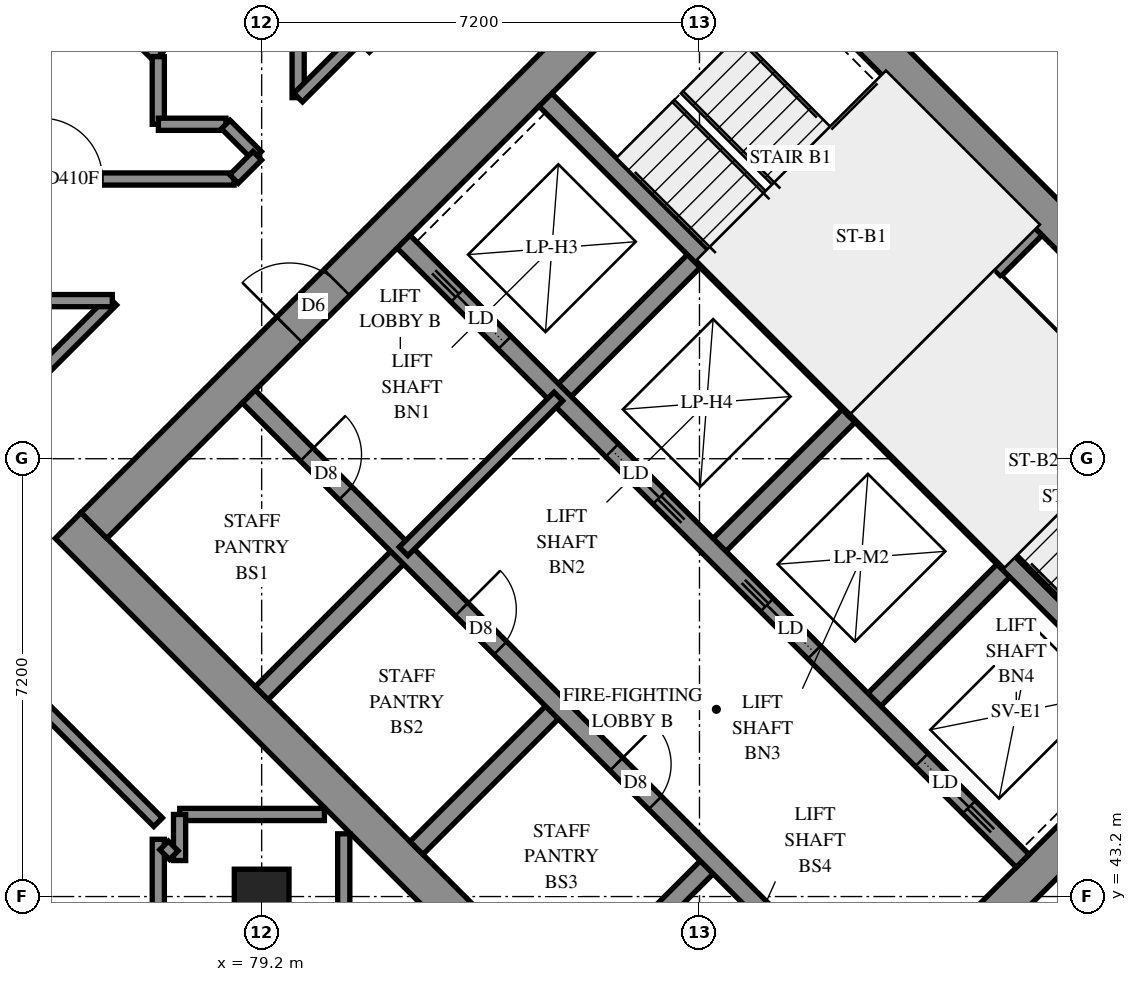
"""IFC4 building model, lengths in metres.
Left out: names, types, materials, properties, quantities, classifications, styles, units other than length and angle.
Written with IfcOpenShell. Run it as: python <this file> out.ifc"""

import sys

from ifc_helpers import new_model, si_unit, direction, frame, frame_2d, origin, origin_2d, place, context, subcontext, project, spatial, rectangle, extrude, element, fill, save


model = new_model("IFC4")
c1 = context("Model", 3, precision=1e-05, world=origin(), true_north=direction((0.0, 1.0)))
c2 = subcontext(c1, "Body", "Model", "MODEL_VIEW")
j1 = project(units=[si_unit("LENGTHUNIT", "METRE"), si_unit("PLANEANGLEUNIT", "RADIAN")], contexts=[c1])
p1 = place(None, origin())
s1 = spatial("IfcSite", under=j1, at=p1, CompositionType="ELEMENT")
p2 = place(p1, origin())
s2 = spatial("IfcBuilding", under=s1, at=p2, CompositionType="ELEMENT")
p3 = place(p2, frame((0.0, 0.0, 142.2)))
s3 = spatial("IfcBuildingStorey", under=s2, at=p3, CompositionType="ELEMENT", Elevation=142.2)
p4 = place(p3, frame((79.2, 43.2, 0.0), z_axis=(0.0, 0.0, 1.0), x_axis=(1.0, 0.0, 0.0)))
e1 = element("IfcColumn", 1, at=p4, inside=s3, PredefinedType="COLUMN", context=c2, shape_type="SweptSolid", body=[
    extrude(rectangle(XDim=0.9, YDim=0.9, at=origin_2d()), origin(), (0.0, 0.0, 1.0), 3.1),
])
p5 = place(p3, frame((76.018, 49.302, -0.3), z_axis=(0.0, 0.0, 1.0), x_axis=(0.7071067812, -0.7071067812, 0.0)))
e2 = element("IfcWall", 2, at=p5, inside=s3, PredefinedType="SHEAR", context=c2, shape_type="SweptSolid", body=[
    extrude(rectangle(XDim=15.6, YDim=0.6, at=frame_2d((7.8, 0.0))), origin(), (0.0, 0.0, 1.0), 2.7),
])
p6 = place(p3, frame((86.625, 59.908, -0.3), z_axis=(0.0, 0.0, 1.0), x_axis=(0.7071067812, -0.7071067812, 0.0)))
e3 = element("IfcWall", 3, at=p6, inside=s3, PredefinedType="SHEAR", context=c2, shape_type="SweptSolid", body=[
    extrude(rectangle(XDim=15.6, YDim=0.6, at=frame_2d((7.8, 0.0))), origin(), (0.0, 0.0, 1.0), 2.7),
])
p7 = place(p6, frame((10.6, 0.0, 0.3)))
e4 = element("IfcOpeningElement", 4, at=p7, cuts=e3, PredefinedType="OPENING", context=c2, shape_type="SweptSolid", body=[
    extrude(rectangle(XDim=0.8, YDim=2.1, at=frame_2d((0.4, 1.05))), frame((0.0, 0.31, 0.0), z_axis=(0.0, -1.0, 0.0), x_axis=(1.0, 0.0, 0.0)), (0.0, 0.0, 1.0), 0.62),
])
p8 = place(p3, frame((76.442, 49.302, -0.3), z_axis=(0.0, 0.0, 1.0), x_axis=(0.7071067812, 0.7071067812, 0.0)))
e5 = element("IfcWall", 5, at=p8, inside=s3, PredefinedType="SHEAR", context=c2, shape_type="SweptSolid", body=[
    extrude(rectangle(XDim=14.4, YDim=0.6, at=frame_2d((7.2, 0.0))), origin(), (0.0, 0.0, 1.0), 2.7),
])
p9 = place(p8, frame((4.55, 0.0, 0.3)))
e6 = element("IfcOpeningElement", 6, at=p9, cuts=e5, PredefinedType="OPENING", context=c2, shape_type="SweptSolid", body=[
    extrude(rectangle(XDim=1.1, YDim=2.1, at=frame_2d((0.55, 1.05))), frame((0.0, 0.31, 0.0), z_axis=(0.0, -1.0, 0.0), x_axis=(1.0, 0.0, 0.0)), (0.0, 0.0, 1.0), 0.62),
])
p10 = place(p8, frame((11.35, 0.0, 0.3)))
e7 = element("IfcOpeningElement", 7, at=p10, cuts=e5, PredefinedType="OPENING", context=c2, shape_type="SweptSolid", body=[
    extrude(rectangle(XDim=1.1, YDim=2.1, at=frame_2d((0.55, 1.05))), frame((0.0, 0.31, 0.0), z_axis=(0.0, -1.0, 0.0), x_axis=(1.0, 0.0, 0.0)), (0.0, 0.0, 1.0), 0.62),
])
p11 = place(p3, frame((87.049, 38.695, -0.3), z_axis=(0.0, 0.0, 1.0), x_axis=(0.7071067812, 0.7071067812, 0.0)))
e8 = element("IfcWall", 8, at=p11, inside=s3, PredefinedType="SHEAR", context=c2, shape_type="SweptSolid", body=[
    extrude(rectangle(XDim=14.4, YDim=0.6, at=frame_2d((7.2, 0.0))), origin(), (0.0, 0.0, 1.0), 2.7),
])
p12 = place(p11, frame((4.55, 0.0, 0.3)))
e9 = element("IfcOpeningElement", 9, at=p12, cuts=e8, PredefinedType="OPENING", context=c2, shape_type="SweptSolid", body=[
    extrude(rectangle(XDim=1.1, YDim=2.1, at=frame_2d((0.55, 1.05))), frame((0.0, 0.31, 0.0), z_axis=(0.0, -1.0, 0.0), x_axis=(1.0, 0.0, 0.0)), (0.0, 0.0, 1.0), 0.62),
])
p13 = place(p11, frame((11.35, 0.0, 0.3)))
e10 = element("IfcOpeningElement", 10, at=p13, cuts=e8, PredefinedType="OPENING", context=c2, shape_type="SweptSolid", body=[
    extrude(rectangle(XDim=1.1, YDim=2.1, at=frame_2d((0.55, 1.05))), frame((0.0, 0.31, 0.0), z_axis=(0.0, -1.0, 0.0), x_axis=(1.0, 0.0, 0.0)), (0.0, 0.0, 1.0), 0.62),
])
for number, where, z_axis, x_axis in (
    (11, (79.2, 46.544, 0.0), (0.0, 0.0, 1.0), (0.707, 0.707, 0.0)),
    (12, (84.079, 51.423, 0.0), (0.0, 0.0, 1.0), (0.707, 0.707, 0.0)),
):
    element("IfcWall", number, at=place(p3, frame(where, z_axis=z_axis, x_axis=x_axis)), inside=s3, PredefinedType="SOLIDWALL", context=c2, shape_type="SweptSolid", body=[
        extrude(rectangle(XDim=3.3, YDim=0.3, at=frame_2d((1.65, 0.0))), origin(), (0.0, 0.0, 1.0), 3.1),
    ])
p14 = place(p3, frame((81.746, 43.999, 0.0), z_axis=(0.0, 0.0, 1.0), x_axis=(0.7071067812, 0.7071067812, 0.0)))
e13 = element("IfcWall", 13, at=p14, inside=s3, PredefinedType="SOLIDWALL", context=c2, shape_type="SweptSolid", body=[
    extrude(rectangle(XDim=3.3, YDim=0.3, at=frame_2d((1.65, 0.0))), origin(), (0.0, 0.0, 1.0), 3.1),
])
p15 = place(p3, frame((86.625, 48.878, 0.0), z_axis=(0.0, 0.0, 1.0), x_axis=(0.7071067812, 0.7071067812, 0.0)))
e14 = element("IfcWall", 14, at=p15, inside=s3, PredefinedType="SOLIDWALL", context=c2, shape_type="SweptSolid", body=[
    extrude(rectangle(XDim=3.3, YDim=0.3, at=frame_2d((1.65, 0.0))), origin(), (0.0, 0.0, 1.0), 3.1),
])
p16 = place(p3, frame((84.291, 41.453, 0.0), z_axis=(0.0, 0.0, 1.0), x_axis=(0.7071067812, 0.7071067812, 0.0)))
e15 = element("IfcWall", 15, at=p16, inside=s3, PredefinedType="SOLIDWALL", context=c2, shape_type="SweptSolid", body=[
    extrude(rectangle(XDim=3.3, YDim=0.3, at=frame_2d((1.65, 0.0))), origin(), (0.0, 0.0, 1.0), 3.1),
])
p17 = place(p3, frame((89.17, 46.332, 0.0), z_axis=(0.0, 0.0, 1.0), x_axis=(0.7071067812, 0.7071067812, 0.0)))
e16 = element("IfcWall", 16, at=p17, inside=s3, PredefinedType="SOLIDWALL", context=c2, shape_type="SweptSolid", body=[
    extrude(rectangle(XDim=3.3, YDim=0.3, at=frame_2d((1.65, 0.0))), origin(), (0.0, 0.0, 1.0), 3.1),
])
p18 = place(p3, frame((78.988, 51.423, 0.0), z_axis=(0.0, 0.0, 1.0), x_axis=(0.7071067812, -0.7071067812, 0.0)))
e17 = element("IfcWall", 17, at=p18, inside=s3, PredefinedType="SOLIDWALL", context=c2, shape_type="SweptSolid", body=[
    extrude(rectangle(XDim=14.4, YDim=0.3, at=frame_2d((7.2, 0.0))), origin(), (0.0, 0.0, 1.0), 3.1),
])
p19 = place(p18, frame((1.35, 0.0, 0.0)))
e18 = element("IfcOpeningElement", 18, at=p19, cuts=e17, PredefinedType="OPENING", context=c2, shape_type="SweptSolid", body=[
    extrude(rectangle(XDim=0.9, YDim=2.1, at=frame_2d((0.45, 1.05))), frame((0.0, 0.16, 0.0), z_axis=(0.0, -1.0, 0.0), x_axis=(1.0, 0.0, 0.0)), (0.0, 0.0, 1.0), 0.32),
])
p20 = place(p18, frame((4.95, 0.0, 0.0)))
e19 = element("IfcOpeningElement", 19, at=p20, cuts=e17, PredefinedType="OPENING", context=c2, shape_type="SweptSolid", body=[
    extrude(rectangle(XDim=0.9, YDim=2.1, at=frame_2d((0.45, 1.05))), frame((0.0, 0.16, 0.0), z_axis=(0.0, -1.0, 0.0), x_axis=(1.0, 0.0, 0.0)), (0.0, 0.0, 1.0), 0.32),
])
p21 = place(p18, frame((8.55, 0.0, 0.0)))
e20 = element("IfcOpeningElement", 20, at=p21, cuts=e17, PredefinedType="OPENING", context=c2, shape_type="SweptSolid", body=[
    extrude(rectangle(XDim=0.9, YDim=2.1, at=frame_2d((0.45, 1.05))), frame((0.0, 0.16, 0.0), z_axis=(0.0, -1.0, 0.0), x_axis=(1.0, 0.0, 0.0)), (0.0, 0.0, 1.0), 0.32),
])
p22 = place(p18, frame((12.05, 0.0, 0.0)))
e21 = element("IfcOpeningElement", 21, at=p22, cuts=e17, PredefinedType="OPENING", context=c2, shape_type="SweptSolid", body=[
    extrude(rectangle(XDim=1.1, YDim=2.1, at=frame_2d((0.55, 1.05))), frame((0.0, 0.16, 0.0), z_axis=(0.0, -1.0, 0.0), x_axis=(1.0, 0.0, 0.0)), (0.0, 0.0, 1.0), 0.32),
])
p23 = place(p3, frame((81.534, 53.969, 0.0), z_axis=(0.0, 0.0, 1.0), x_axis=(0.707103309, -0.7071102534, 0.0)))
e22 = element("IfcWall", 22, at=p23, inside=s3, PredefinedType="SOLIDWALL", context=c2, shape_type="SweptSolid", body=[
    extrude(rectangle(XDim=14.4, YDim=0.3, at=frame_2d((7.2, 0.0))), origin(), (0.0, 0.0, 1.0), 3.1),
])
p24 = place(p23, frame((1.25, 0.0, 0.0)))
e23 = element("IfcOpeningElement", 23, at=p24, cuts=e22, PredefinedType="OPENING", context=c2, shape_type="SweptSolid", body=[
    extrude(rectangle(XDim=1.1, YDim=2.1, at=frame_2d((0.55, 1.05))), frame((0.0, 0.16, 0.0), z_axis=(0.0, -1.0, 0.0), x_axis=(1.0, 0.0, 0.0)), (0.0, 0.0, 1.0), 0.32),
])
p25 = place(p23, frame((4.85, 0.0, 0.0)))
e24 = element("IfcOpeningElement", 24, at=p25, cuts=e22, PredefinedType="OPENING", context=c2, shape_type="SweptSolid", body=[
    extrude(rectangle(XDim=1.1, YDim=2.1, at=frame_2d((0.55, 1.05))), frame((0.0, 0.16, 0.0), z_axis=(0.0, -1.0, 0.0), x_axis=(1.0, 0.0, 0.0)), (0.0, 0.0, 1.0), 0.32),
])
p26 = place(p23, frame((8.45, 0.0, 0.0)))
e25 = element("IfcOpeningElement", 25, at=p26, cuts=e22, PredefinedType="OPENING", context=c2, shape_type="SweptSolid", body=[
    extrude(rectangle(XDim=1.1, YDim=2.1, at=frame_2d((0.55, 1.05))), frame((0.0, 0.16, 0.0), z_axis=(0.0, -1.0, 0.0), x_axis=(1.0, 0.0, 0.0)), (0.0, 0.0, 1.0), 0.32),
])
p27 = place(p23, frame((12.05, 0.0, 0.0)))
e26 = element("IfcOpeningElement", 26, at=p27, cuts=e22, PredefinedType="OPENING", context=c2, shape_type="SweptSolid", body=[
    extrude(rectangle(XDim=1.1, YDim=2.1, at=frame_2d((0.55, 1.05))), frame((0.0, 0.16, 0.0), z_axis=(0.0, -1.0, 0.0), x_axis=(1.0, 0.0, 0.0)), (0.0, 0.0, 1.0), 0.32),
])
for number, where, z_axis, x_axis in (
    (27, (83.867, 56.302, 0.0), (0.0, 0.0, 1.0), (0.707, -0.707, 0.0)),
    (28, (88.958, 51.211, 0.0), (0.0, 0.0, 1.0), (0.707, -0.707, 0.0)),
):
    element("IfcWall", number, at=place(p3, frame(where, z_axis=z_axis, x_axis=x_axis)), inside=s3, PredefinedType="SOLIDWALL", context=c2, shape_type="SweptSolid", body=[
        extrude(rectangle(XDim=7.2, YDim=0.3, at=frame_2d((3.6, 0.0))), origin(), (0.0, 0.0, 1.0), 3.1),
    ])
p28 = place(p3, frame((88.958, 51.211, 0.0), z_axis=(0.0, 0.0, 1.0), x_axis=(0.7071067812, 0.7071067812, 0.0)))
e29 = element("IfcWall", 29, at=p28, inside=s3, PredefinedType="SOLIDWALL", context=c2, shape_type="SweptSolid", body=[
    extrude(rectangle(XDim=4.2, YDim=0.3, at=frame_2d((2.1, 0.0))), origin(), (0.0, 0.0, 1.0), 3.1),
])
p29 = place(p3, frame((91.313, 53.354, 0.0), z_axis=(0.0, 0.0, 1.0), x_axis=(0.7071140275, -0.7070995348, 0.0)))
e30 = element("IfcWall", 30, at=p29, inside=s3, PredefinedType="PARTITIONING", context=c2, shape_type="SweptSolid", body=[
    extrude(rectangle(XDim=6.9, YDim=0.15, at=frame_2d((3.45, 0.0))), origin(), (0.0, 0.0, 1.0), 3.1),
])
p30 = place(p3, frame((81.534, 48.878, 0.0), z_axis=(0.0, 0.0, 1.0), x_axis=(0.707092892, 0.7071206701, 0.0)))
e31 = element("IfcWall", 31, at=p30, inside=s3, PredefinedType="PARTITIONING", context=c2, shape_type="SweptSolid", body=[
    extrude(rectangle(XDim=3.6, YDim=0.2, at=frame_2d((1.8, 0.0))), origin(), (0.0, 0.0, 1.0), 3.1),
])
p31 = place(p3, frame((88.326, 61.609, 0.0), z_axis=(0.0, 0.0, 1.0), x_axis=(0.7071067812, -0.7071067812, 0.0)))
e32 = element("IfcWall", 32, at=p31, inside=s3, PredefinedType="PARTITIONING", context=c2, shape_type="SweptSolid", body=[
    extrude(rectangle(XDim=10.14, YDim=0.2, at=frame_2d((5.07, 0.0))), origin(), (0.0, 0.0, 1.0), 3.1),
])
p32 = place(p31, frame((8.422, 0.0, 0.0)))
e33 = element("IfcOpeningElement", 33, at=p32, cuts=e32, PredefinedType="OPENING", context=c2, shape_type="SweptSolid", body=[
    extrude(rectangle(XDim=0.9, YDim=2.1, at=frame_2d((0.45, 1.05))), frame((0.0, 0.11, 0.0), z_axis=(0.0, -1.0, 0.0), x_axis=(1.0, 0.0, 0.0)), (0.0, 0.0, 1.0), 0.22),
])
p33 = place(p3, frame((80.901, 57.157, 0.0), z_axis=(0.0, 0.0, 1.0), x_axis=(0.7071067812, 0.7071067812, 0.0)))
e34 = element("IfcWall", 34, at=p33, inside=s3, PredefinedType="PARTITIONING", context=c2, shape_type="SweptSolid", body=[
    extrude(rectangle(XDim=8.392, YDim=0.2, at=frame_2d((4.196, 0.0))), origin(), (0.0, 0.0, 1.0), 3.1),
])
p34 = place(p3, frame((74.223, 47.697, 0.0), z_axis=(0.0, 0.0, 1.0), x_axis=(0.7071067812, -0.7071067812, 0.0)))
e35 = element("IfcWall", 35, at=p34, inside=s3, PredefinedType="PARTITIONING", context=c2, shape_type="SweptSolid", body=[
    extrude(rectangle(XDim=4.63, YDim=0.2, at=frame_2d((2.315, 0.0))), origin(), (0.0, 0.0, 1.0), 3.1),
])
p35 = place(p34, frame((0.434, 0.0, 0.0)))
e36 = element("IfcOpeningElement", 36, at=p35, cuts=e35, PredefinedType="OPENING", context=c2, shape_type="SweptSolid", body=[
    extrude(rectangle(XDim=1.0, YDim=2.1, at=frame_2d((0.5, 1.05))), frame((0.0, 0.11, 0.0), z_axis=(0.0, -1.0, 0.0), x_axis=(1.0, 0.0, 0.0)), (0.0, 0.0, 1.0), 0.22),
])
p36 = place(p3, frame((74.702, 55.0, 0.0), z_axis=(0.0, 0.0, 1.0), x_axis=(1.0, 0.0, 0.0)))
e37 = element("IfcWall", 37, at=p36, inside=s3, PredefinedType="PARTITIONING", context=c2, shape_type="SweptSolid", body=[
    extrude(rectangle(XDim=4.044, YDim=0.2, at=frame_2d((2.022, 0.0))), origin(), (0.0, 0.0, 1.0), 3.1),
])
p37 = place(p36, frame((0.879, 0.0, 0.0)))
e38 = element("IfcOpeningElement", 38, at=p37, cuts=e37, PredefinedType="OPENING", context=c2, shape_type="SweptSolid", body=[
    extrude(rectangle(XDim=1.0, YDim=2.1, at=frame_2d((0.5, 1.05))), frame((0.0, 0.11, 0.0), z_axis=(0.0, -1.0, 0.0), x_axis=(1.0, 0.0, 0.0)), (0.0, 0.0, 1.0), 0.22),
])
p38 = place(p3, frame((74.699, 59.807, 0.0), z_axis=(0.0, 0.0, 1.0), x_axis=(0.7071067812, -0.7071067812, 0.0)))
e39 = element("IfcWall", 39, at=p38, inside=s3, PredefinedType="PARTITIONING", context=c2, shape_type="SweptSolid", body=[
    extrude(rectangle(XDim=3.957, YDim=0.2, at=frame_2d((1.978, 0.0))), origin(), (0.0, 0.0, 1.0), 3.1),
])
p39 = place(p3, frame((79.8, 56.338, 0.0), z_axis=(0.0, 0.0, 1.0), x_axis=(0.0, 1.0, 0.0)))
e40 = element("IfcWall", 40, at=p39, inside=s3, PredefinedType="PARTITIONING", context=c2, shape_type="SweptSolid", body=[
    extrude(rectangle(XDim=2.962, YDim=0.2, at=frame_2d((1.481, 0.0))), origin(), (0.0, 0.0, 1.0), 3.1),
])
p40 = place(p3, frame((74.701, 50.957, 0.0), z_axis=(0.0, 0.0, 1.0), x_axis=(0.7071067812, 0.7071067812, 0.0)))
e41 = element("IfcWall", 41, at=p40, inside=s3, PredefinedType="PARTITIONING", context=c2, shape_type="SweptSolid", body=[
    extrude(rectangle(XDim=2.888, YDim=0.2, at=frame_2d((1.444, 0.0))), origin(), (0.0, 0.0, 1.0), 3.1),
])
p41 = place(p3, frame((77.5, 41.502, 0.0), z_axis=(0.0, 0.0, 1.0), x_axis=(0.0, 1.0, 0.0)))
e42 = element("IfcWall", 42, at=p41, inside=s3, PredefinedType="PARTITIONING", context=c2, shape_type="SweptSolid", body=[
    extrude(rectangle(XDim=2.64, YDim=0.2, at=frame_2d((1.32, 0.0))), origin(), (0.0, 0.0, 1.0), 3.1),
])
for number, where, z_axis, x_axis in (
    (43, (80.55, 41.852, 0.0), (0.0, 0.0, 1.0), (0.0, 1.0, 0.0)),
    (44, (77.852, 44.55, 0.0), (0.0, 0.0, 1.0), (1.0, 0.0, 0.0)),
):
    element("IfcWall", number, at=place(p3, frame(where, z_axis=z_axis, x_axis=x_axis)), inside=s3, PredefinedType="PARTITIONING", context=c2, shape_type="SweptSolid", body=[
        extrude(rectangle(XDim=2.38, YDim=0.2, at=frame_2d((1.19, 0.0))), origin(), (0.0, 0.0, 1.0), 3.1),
    ])
p42 = place(p3, frame((74.702, 53.0, 0.0), z_axis=(0.0, 0.0, 1.0), x_axis=(1.0, 0.0, 0.0)))
e45 = element("IfcWall", 45, at=p42, inside=s3, PredefinedType="PARTITIONING", context=c2, shape_type="SweptSolid", body=[
    extrude(rectangle(XDim=2.042, YDim=0.2, at=frame_2d((1.021, 0.0))), origin(), (0.0, 0.0, 1.0), 3.1),
])
p43 = place(p3, frame((79.801, 56.339, 0.0), z_axis=(0.0, 0.0, 1.0), x_axis=(0.7071067812, 0.7071067812, 0.0)))
e46 = element("IfcWall", 46, at=p43, inside=s3, PredefinedType="PARTITIONING", context=c2, shape_type="SweptSolid", body=[
    extrude(rectangle(XDim=1.553, YDim=0.2, at=frame_2d((0.776, 0.0))), origin(), (0.0, 0.0, 1.0), 3.1),
])
p44 = place(p3, frame((77.5, 55.9, 0.0), z_axis=(0.0, 0.0, 1.0), x_axis=(0.0, 1.0, 0.0)))
e47 = element("IfcWall", 47, at=p44, inside=s3, PredefinedType="PARTITIONING", context=c2, shape_type="SweptSolid", body=[
    extrude(rectangle(XDim=1.112, YDim=0.2, at=frame_2d((0.556, 0.0))), origin(), (0.0, 0.0, 1.0), 3.1),
])
p45 = place(p3, frame((77.502, 55.9, 0.0), z_axis=(0.0, 0.0, 1.0), x_axis=(1.0, 0.0, 0.0)))
e48 = element("IfcWall", 48, at=p45, inside=s3, PredefinedType="PARTITIONING", context=c2, shape_type="SweptSolid", body=[
    extrude(rectangle(XDim=1.11, YDim=0.2, at=frame_2d((0.555, 0.0))), origin(), (0.0, 0.0, 1.0), 3.1),
])
p46 = place(p3, frame((77.85, 43.792, 0.0), z_axis=(0.0, 0.0, 1.0), x_axis=(0.0, 1.0, 0.0)))
e49 = element("IfcWall", 49, at=p46, inside=s3, PredefinedType="PARTITIONING", context=c2, shape_type="SweptSolid", body=[
    extrude(rectangle(XDim=0.758, YDim=0.2, at=frame_2d((0.379, 0.0))), origin(), (0.0, 0.0, 1.0), 3.1),
])
p47 = place(p3, frame((78.609, 55.897, 0.0), z_axis=(0.0, 0.0, 1.0), x_axis=(0.7071067812, -0.7071067812, 0.0)))
e50 = element("IfcWall", 50, at=p47, inside=s3, PredefinedType="PARTITIONING", context=c2, shape_type="SweptSolid", body=[
    extrude(rectangle(XDim=0.73, YDim=0.2, at=frame_2d((0.365, 0.0))), origin(), (0.0, 0.0, 1.0), 3.1),
])
p48 = place(p3, frame((78.745, 55.001, 0.0), z_axis=(0.0, 0.0, 1.0), x_axis=(0.7071067812, 0.7071067812, 0.0)))
e51 = element("IfcWall", 51, at=p48, inside=s3, PredefinedType="PARTITIONING", context=c2, shape_type="SweptSolid", body=[
    extrude(rectangle(XDim=0.54, YDim=0.2, at=frame_2d((0.27, 0.0))), origin(), (0.0, 0.0, 1.0), 3.1),
])
p49 = place(p3, frame((77.596, 44.04, 0.0), z_axis=(0.0, 0.0, 1.0), x_axis=(0.7071067812, -0.7071067812, 0.0)))
e52 = element("IfcWall", 52, at=p49, inside=s3, PredefinedType="PARTITIONING", context=c2, shape_type="SweptSolid", body=[
    extrude(rectangle(XDim=0.225, YDim=0.2, at=frame_2d((0.113, 0.0))), origin(), (0.0, 0.0, 1.0), 3.1),
])
p50 = place(p9, origin())
e53 = element("IfcDoor", 53, at=p50, inside=s3, OperationType="DOUBLE_DOOR_SINGLE_SWING", PredefinedType="DOOR", context=c2, shape_type="SweptSolid", body=[
    extrude(rectangle(XDim=1.1, YDim=2.1, at=frame_2d((0.55, 1.05))), frame((0.0, 0.025, 0.0), z_axis=(0.0, -1.0, 0.0), x_axis=(1.0, 0.0, 0.0)), (0.0, 0.0, 1.0), 0.05),
])
fill(e6, e53)
p51 = place(p19, origin())
e54 = element("IfcDoor", 54, at=p51, inside=s3, OperationType="SINGLE_SWING_LEFT", PredefinedType="DOOR", context=c2, shape_type="SweptSolid", body=[
    extrude(rectangle(XDim=0.9, YDim=2.1, at=frame_2d((0.45, 1.05))), frame((0.0, 0.025, 0.0), z_axis=(0.0, -1.0, 0.0), x_axis=(1.0, 0.0, 0.0)), (0.0, 0.0, 1.0), 0.05),
])
fill(e18, e54)
p52 = place(p20, origin())
e55 = element("IfcDoor", 55, at=p52, inside=s3, OperationType="SINGLE_SWING_LEFT", PredefinedType="DOOR", context=c2, shape_type="SweptSolid", body=[
    extrude(rectangle(XDim=0.9, YDim=2.1, at=frame_2d((0.45, 1.05))), frame((0.0, 0.025, 0.0), z_axis=(0.0, -1.0, 0.0), x_axis=(1.0, 0.0, 0.0)), (0.0, 0.0, 1.0), 0.05),
])
fill(e19, e55)
p53 = place(p21, origin())
e56 = element("IfcDoor", 56, at=p53, inside=s3, OperationType="SINGLE_SWING_LEFT", PredefinedType="DOOR", context=c2, shape_type="SweptSolid", body=[
    extrude(rectangle(XDim=0.9, YDim=2.1, at=frame_2d((0.45, 1.05))), frame((0.0, 0.025, 0.0), z_axis=(0.0, -1.0, 0.0), x_axis=(1.0, 0.0, 0.0)), (0.0, 0.0, 1.0), 0.05),
])
fill(e20, e56)
p54 = place(p24, origin())
e57 = element("IfcDoor", 57, at=p54, inside=s3, OperationType="SLIDING_TO_LEFT", PredefinedType="DOOR", context=c2, shape_type="SweptSolid", body=[
    extrude(rectangle(XDim=1.1, YDim=2.1, at=frame_2d((0.55, 1.05))), frame((0.0, 0.025, 0.0), z_axis=(0.0, -1.0, 0.0), x_axis=(1.0, 0.0, 0.0)), (0.0, 0.0, 1.0), 0.05),
])
fill(e23, e57)
p55 = place(p25, origin())
e58 = element("IfcDoor", 58, at=p55, inside=s3, OperationType="SLIDING_TO_RIGHT", PredefinedType="DOOR", context=c2, shape_type="SweptSolid", body=[
    extrude(rectangle(XDim=1.1, YDim=2.1, at=frame_2d((0.55, 1.05))), frame((0.0, 0.025, 0.0), z_axis=(0.0, -1.0, 0.0), x_axis=(1.0, 0.0, 0.0)), (0.0, 0.0, 1.0), 0.05),
])
fill(e24, e58)
p56 = place(p26, origin())
e59 = element("IfcDoor", 59, at=p56, inside=s3, OperationType="SLIDING_TO_LEFT", PredefinedType="DOOR", context=c2, shape_type="SweptSolid", body=[
    extrude(rectangle(XDim=1.1, YDim=2.1, at=frame_2d((0.55, 1.05))), frame((0.0, 0.025, 0.0), z_axis=(0.0, -1.0, 0.0), x_axis=(1.0, 0.0, 0.0)), (0.0, 0.0, 1.0), 0.05),
])
fill(e25, e59)
p57 = place(p27, origin())
e60 = element("IfcDoor", 60, at=p57, inside=s3, OperationType="SLIDING_TO_RIGHT", PredefinedType="DOOR", context=c2, shape_type="SweptSolid", body=[
    extrude(rectangle(XDim=1.1, YDim=2.1, at=frame_2d((0.55, 1.05))), frame((0.0, 0.025, 0.0), z_axis=(0.0, -1.0, 0.0), x_axis=(1.0, 0.0, 0.0)), (0.0, 0.0, 1.0), 0.05),
])
fill(e26, e60)
p58 = place(p37, origin())
e61 = element("IfcDoor", 61, at=p58, inside=s3, OperationType="SINGLE_SWING_LEFT", PredefinedType="DOOR", context=c2, shape_type="SweptSolid", body=[
    extrude(rectangle(XDim=1.0, YDim=2.1, at=frame_2d((0.5, 1.05))), frame((0.0, 0.025, 0.0), z_axis=(0.0, -1.0, 0.0), x_axis=(1.0, 0.0, 0.0)), (0.0, 0.0, 1.0), 0.05),
])
fill(e38, e61)
save(model, sys.argv[1])
